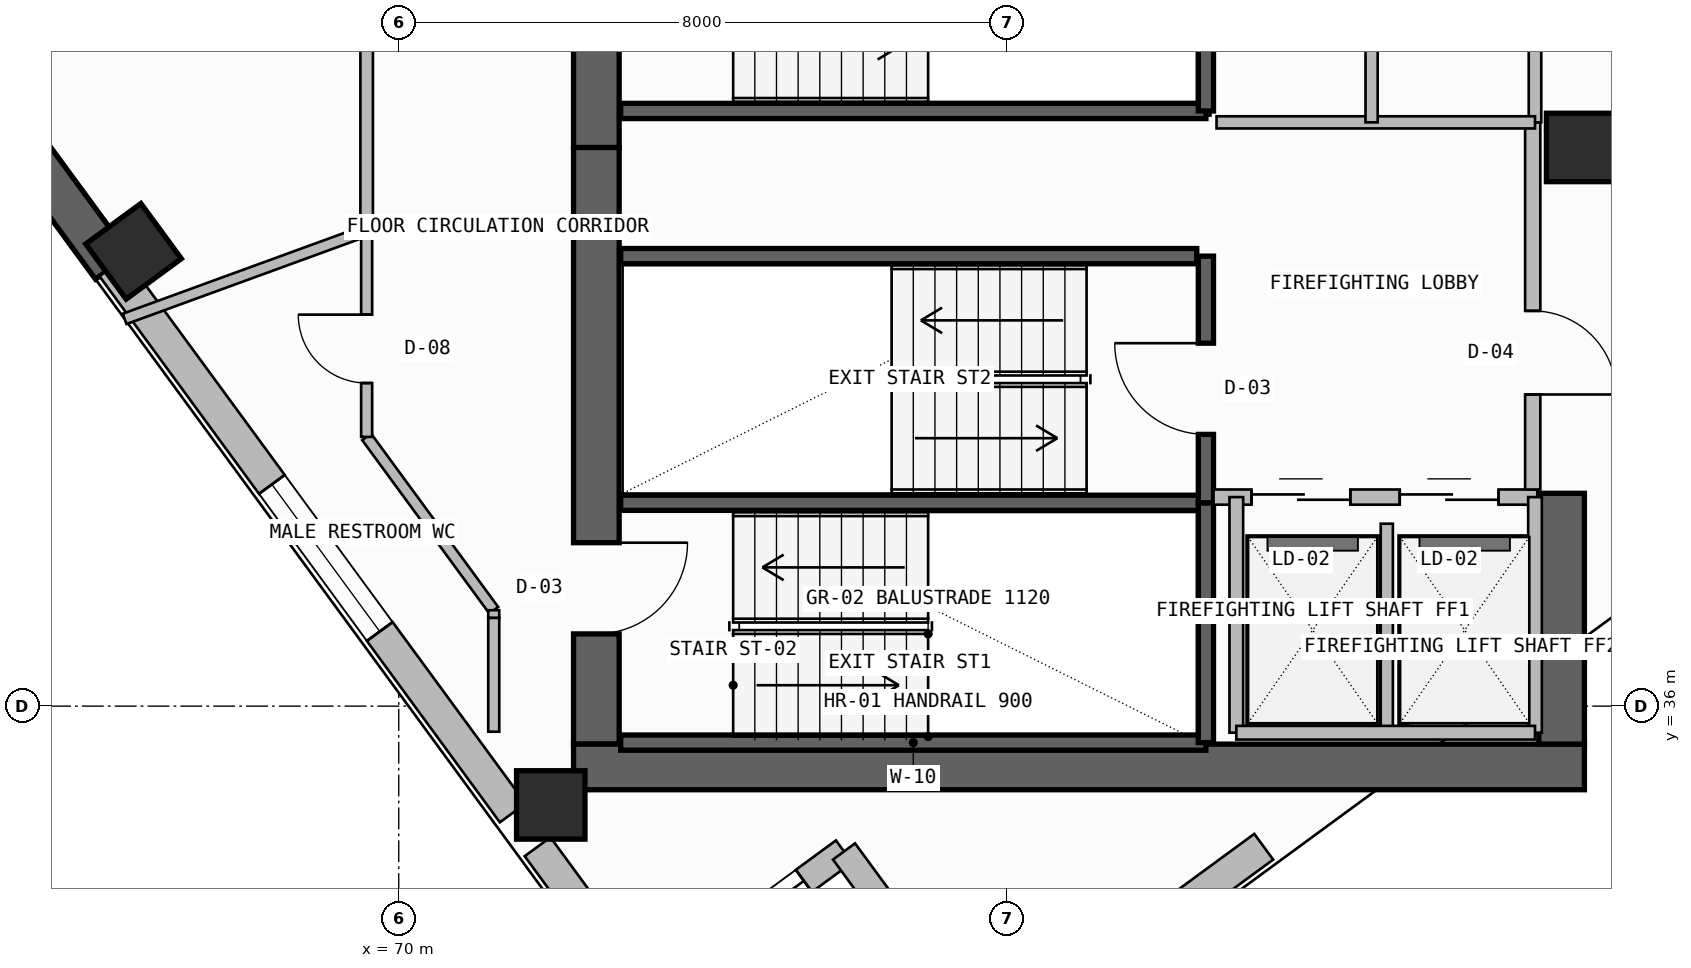
"""IFC4 building model, lengths in metres.
Left out: names, types, materials, properties, quantities, classifications, styles, units other than length and angle.
Written with IfcOpenShell. Run it as: python <this file> out.ifc"""

import sys

from ifc_helpers import new_model, si_unit, direction, frame, frame_2d, origin, origin_2d, place, context, subcontext, project, spatial, rectangle, extrude, element, fill, save


model = new_model("IFC4")
c1 = context("Model", 3, precision=1e-05, world=origin(), true_north=direction((0.0, 1.0)))
c2 = subcontext(c1, "Body", "Model", "MODEL_VIEW")
j1 = project(units=[si_unit("LENGTHUNIT", "METRE"), si_unit("PLANEANGLEUNIT", "RADIAN")], contexts=[c1])
p1 = place(None, origin())
s1 = spatial("IfcSite", under=j1, at=p1, CompositionType="ELEMENT")
p2 = place(p1, origin())
s2 = spatial("IfcBuilding", under=s1, at=p2, CompositionType="ELEMENT")
p3 = place(p2, frame((0.0, 0.0, 260.74)))
s3 = spatial("IfcBuildingStorey", under=s2, at=p3, CompositionType="ELEMENT", Elevation=260.74)
p4 = place(p3, frame((72.6, 35.5, -0.26), z_axis=(0.0, 0.0, 1.0), x_axis=(0.0, 1.0, 0.0)))
e1 = element("IfcWall", 1, at=p4, inside=s3, PredefinedType="SHEAR", context=c2, shape_type="SweptSolid", body=[
    extrude(rectangle(XDim=7.85, YDim=0.6, at=frame_2d((3.925, 0.0))), origin(), (0.0, 0.0, 1.0), 3.52),
])
p5 = place(p4, frame((1.45, 0.0, 0.26)))
e2 = element("IfcOpeningElement", 2, at=p5, cuts=e1, PredefinedType="OPENING", context=c2, shape_type="SweptSolid", body=[
    extrude(rectangle(XDim=1.2, YDim=2.2, at=frame_2d((0.6, 1.1))), frame((0.0, 0.31, 0.0), z_axis=(0.0, -1.0, 0.0), x_axis=(1.0, 0.0, 0.0)), (0.0, 0.0, 1.0), 0.62),
])
p6 = place(p3, frame((72.3, 35.2, -0.26), z_axis=(0.0, 0.0, 1.0), x_axis=(1.0, 0.0, 0.0)))
e3 = element("IfcWall", 3, at=p6, inside=s3, PredefinedType="SHEAR", context=c2, shape_type="SweptSolid", body=[
    extrude(rectangle(XDim=13.3, YDim=0.6, at=frame_2d((6.65, 0.0))), origin(), (0.0, 0.0, 1.0), 3.52),
])
p7 = place(p3, frame((85.3, 35.5, -0.26), z_axis=(0.0, 0.0, 1.0), x_axis=(0.0, 1.0, 0.0)))
e4 = element("IfcWall", 4, at=p7, inside=s3, PredefinedType="SHEAR", context=c2, shape_type="SweptSolid", body=[
    extrude(rectangle(XDim=3.3, YDim=0.6, at=frame_2d((1.65, 0.0))), origin(), (0.0, 0.0, 1.0), 3.52),
])
p8 = place(p3, frame((72.6, 43.35, -0.26), z_axis=(0.0, 0.0, 1.0), x_axis=(0.0, 1.0, 0.0)))
e5 = element("IfcWall", 5, at=p8, inside=s3, PredefinedType="SHEAR", context=c2, shape_type="SweptSolid", body=[
    extrude(rectangle(XDim=12.7, YDim=0.6, at=frame_2d((6.35, 0.0))), origin(), (0.0, 0.0, 1.0), 3.52),
])
p9 = place(p8, frame((1.35, 0.0, 0.26)))
e6 = element("IfcOpeningElement", 6, at=p9, cuts=e5, PredefinedType="OPENING", context=c2, shape_type="SweptSolid", body=[
    extrude(rectangle(XDim=1.2, YDim=2.2, at=frame_2d((0.6, 1.1))), frame((0.0, 0.31, 0.0), z_axis=(0.0, -1.0, 0.0), x_axis=(1.0, 0.0, 0.0)), (0.0, 0.0, 1.0), 0.62),
])
for number, where, z_axis, x_axis in (
    (7, (72.0, 34.7, 0.0), (0.0, 0.0, 1.0), (1.0, 0.0, 0.0)),
    (8, (85.55, 43.35, 0.0), (0.0, 0.0, 1.0), (1.0, 0.0, 0.0)),
    (9, (66.51, 41.983, 0.0), (0.0, 0.0, 1.0), (-0.591, 0.806, 0.0)),
):
    element("IfcColumn", number, at=place(p3, frame(where, z_axis=z_axis, x_axis=x_axis)), inside=s3, PredefinedType="COLUMN", context=c2, shape_type="SweptSolid", body=[
        extrude(rectangle(XDim=0.9, YDim=0.9, at=origin_2d()), origin(), (0.0, 0.0, 1.0), 3.52),
    ])
p10 = place(p3, frame((77.76, 31.495, 0.0), z_axis=(0.0, 0.0, 1.0), x_axis=(0.806458583304, 0.591290582891, 0.0)))
e10 = element("IfcWall", 10, at=p10, inside=s3, PredefinedType="SOLIDWALL", context=c2, shape_type="SweptSolid", body=[
    extrude(rectangle(XDim=4.49, YDim=0.42, at=frame_2d((2.245, 0.0))), origin(), (0.0, 0.0, 1.0), 3.26),
])
p11 = place(p3, frame((55.475, 56.45, -0.26), z_axis=(0.0, 0.0, 1.0), x_axis=(0.591309555876, -0.806444672082, 0.0)))
e11 = element("IfcWall", 11, at=p11, inside=s3, PredefinedType="SHEAR", context=c2, shape_type="SweptSolid", body=[
    extrude(rectangle(XDim=18.192, YDim=0.55, at=frame_2d((9.096, 0.0))), origin(), (0.0, 0.0, 1.0), 3.52),
])
p12 = place(p3, frame((66.232, 41.779, 0.0), z_axis=(0.0, 0.0, 1.0), x_axis=(0.591309008949, -0.806445073105, 0.0)))
e12 = element("IfcWall", 12, at=p12, inside=s3, PredefinedType="SOLIDWALL", context=c2, shape_type="SweptSolid", body=[
    extrude(rectangle(XDim=8.908, YDim=0.42, at=frame_2d((4.454, 0.0))), origin(), (0.0, 0.0, 1.0), 2.237),
])
p13 = place(p12, frame((3.549, 0.0, 0.957)))
e13 = element("IfcOpeningElement", 13, at=p13, cuts=e12, PredefinedType="OPENING", context=c2, shape_type="SweptSolid", body=[
    extrude(rectangle(XDim=2.4, YDim=1.2, at=frame_2d((1.2, 0.6))), frame((0.0, 0.22, 0.0), z_axis=(0.0, -1.0, 0.0), x_axis=(1.0, 0.0, 0.0)), (0.0, 0.0, 1.0), 0.44),
])
p14 = place(p3, frame((71.826, 34.15, 0.0), z_axis=(0.0, 0.0, 1.0), x_axis=(0.591315835946, -0.806440067308, 0.0)))
e14 = element("IfcWall", 14, at=p14, inside=s3, PredefinedType="SOLIDWALL", context=c2, shape_type="SweptSolid", body=[
    extrude(rectangle(XDim=2.434, YDim=0.42, at=frame_2d((1.217, 0.0))), origin(), (0.0, 0.0, 1.0), 3.26),
])
p15 = place(p3, frame((73.044, 32.024, 0.0), z_axis=(0.0, 0.0, 1.0), x_axis=(0.806433906667, 0.591324237774, 0.0)))
e15 = element("IfcWall", 15, at=p15, inside=s3, PredefinedType="SOLIDWALL", context=c2, shape_type="SweptSolid", body=[
    extrude(rectangle(XDim=3.49, YDim=0.36, at=frame_2d((1.745, 0.0))), origin(), (0.0, 0.0, 1.0), 3.26),
])
p16 = place(p15, frame((1.535, 0.0, 0.45)))
e16 = element("IfcOpeningElement", 16, at=p16, cuts=e15, PredefinedType="OPENING", context=c2, shape_type="SweptSolid", body=[
    extrude(rectangle(XDim=1.3, YDim=2.4, at=frame_2d((0.65, 1.2))), frame((0.0, 0.19, 0.0), z_axis=(0.0, -1.0, 0.0), x_axis=(1.0, 0.0, 0.0)), (0.0, 0.0, 1.0), 0.38),
])
p17 = place(p3, frame((75.859, 34.088, 0.0), z_axis=(0.0, 0.0, 1.0), x_axis=(0.591336371625, -0.806425009281, 0.0)))
e17 = element("IfcWall", 17, at=p17, inside=s3, PredefinedType="SOLIDWALL", context=c2, shape_type="SweptSolid", body=[
    extrude(rectangle(XDim=3.49, YDim=0.36, at=frame_2d((1.745, 0.0))), origin(), (0.0, 0.0, 1.0), 3.26),
])
for number, where, z_axis, x_axis in (
    (18, (72.92, 35.52, -0.26), (0.0, 0.0, 1.0), (1.0, 0.0, 0.0)),
    (19, (72.92, 38.675, -0.26), (0.0, 0.0, 1.0), (1.0, 0.0, 0.0)),
):
    element("IfcWall", number, at=place(p3, frame(where, z_axis=z_axis, x_axis=x_axis)), inside=s3, PredefinedType="SOLIDWALL", context=c2, shape_type="SweptSolid", body=[
        extrude(rectangle(XDim=7.7, YDim=0.2, at=frame_2d((3.85, 0.0))), origin(), (0.0, 0.0, 1.0), 3.52),
    ])
p18 = place(p3, frame((80.62, 35.52, -0.26), z_axis=(0.0, 0.0, 1.0), x_axis=(0.0, 1.0, 0.0)))
e20 = element("IfcWall", 20, at=p18, inside=s3, PredefinedType="SOLIDWALL", context=c2, shape_type="SweptSolid", body=[
    extrude(rectangle(XDim=3.155, YDim=0.2, at=frame_2d((1.578, 0.0))), origin(), (0.0, 0.0, 1.0), 3.52),
])
p19 = place(p3, frame((80.62, 38.675, -0.26), z_axis=(0.0, 0.0, 1.0), x_axis=(0.0, 1.0, 0.0)))
e21 = element("IfcWall", 21, at=p19, inside=s3, PredefinedType="SOLIDWALL", context=c2, shape_type="SweptSolid", body=[
    extrude(rectangle(XDim=3.245, YDim=0.2, at=frame_2d((1.623, 0.0))), origin(), (0.0, 0.0, 1.0), 3.52),
])
p20 = place(p19, frame((0.9, 0.0, 0.26)))
e22 = element("IfcOpeningElement", 22, at=p20, cuts=e21, PredefinedType="OPENING", context=c2, shape_type="SweptSolid", body=[
    extrude(rectangle(XDim=1.2, YDim=2.2, at=frame_2d((0.6, 1.1))), frame((0.0, 0.11, 0.0), z_axis=(0.0, -1.0, 0.0), x_axis=(1.0, 0.0, 0.0)), (0.0, 0.0, 1.0), 0.22),
])
p21 = place(p3, frame((80.72, 38.75, 0.0), z_axis=(0.0, 0.0, 1.0), x_axis=(1.0, 0.0, 0.0)))
e23 = element("IfcWall", 23, at=p21, inside=s3, PredefinedType="SOLIDWALL", context=c2, shape_type="SweptSolid", body=[
    extrude(rectangle(XDim=4.26, YDim=0.2, at=frame_2d((2.13, 0.0))), origin(), (0.0, 0.0, 1.0), 3.26),
])
p22 = place(p21, frame((0.5, 0.0, 0.0)))
e24 = element("IfcOpeningElement", 24, at=p22, cuts=e23, PredefinedType="OPENING", context=c2, shape_type="SweptSolid", body=[
    extrude(rectangle(XDim=1.3, YDim=2.3, at=frame_2d((0.65, 1.15))), frame((0.0, 0.11, 0.0), z_axis=(0.0, -1.0, 0.0), x_axis=(1.0, 0.0, 0.0)), (0.0, 0.0, 1.0), 0.22),
])
p23 = place(p21, frame((2.45, 0.0, 0.0)))
e25 = element("IfcOpeningElement", 25, at=p23, cuts=e23, PredefinedType="OPENING", context=c2, shape_type="SweptSolid", body=[
    extrude(rectangle(XDim=1.3, YDim=2.3, at=frame_2d((0.65, 1.15))), frame((0.0, 0.11, 0.0), z_axis=(0.0, -1.0, 0.0), x_axis=(1.0, 0.0, 0.0)), (0.0, 0.0, 1.0), 0.22),
])
p24 = place(p3, frame((83.0, 35.65, 0.0), z_axis=(0.0, 0.0, 1.0), x_axis=(0.0, 1.0, 0.0)))
e26 = element("IfcWall", 26, at=p24, inside=s3, PredefinedType="PLUMBINGWALL", context=c2, shape_type="SweptSolid", body=[
    extrude(rectangle(XDim=2.75, YDim=0.16, at=frame_2d((1.375, 0.0))), origin(), (0.0, 0.0, 1.0), 3.26),
])
for number, where, z_axis, x_axis in (
    (27, (84.95, 35.65, 0.0), (0.0, 0.0, 1.0), (0.0, 1.0, 0.0)),
    (28, (81.02, 35.65, 0.0), (0.0, 0.0, 1.0), (0.0, 1.0, 0.0)),
):
    element("IfcWall", number, at=place(p3, frame(where, z_axis=z_axis, x_axis=x_axis)), inside=s3, PredefinedType="SOLIDWALL", context=c2, shape_type="SweptSolid", body=[
        extrude(rectangle(XDim=3.1, YDim=0.18, at=frame_2d((1.55, 0.0))), origin(), (0.0, 0.0, 1.0), 3.26),
    ])
p25 = place(p3, frame((81.02, 35.65, 0.0), z_axis=(0.0, 0.0, 1.0), x_axis=(1.0, 0.0, 0.0)))
e29 = element("IfcWall", 29, at=p25, inside=s3, PredefinedType="SOLIDWALL", context=c2, shape_type="SweptSolid", body=[
    extrude(rectangle(XDim=3.93, YDim=0.18, at=frame_2d((1.965, 0.0))), origin(), (0.0, 0.0, 1.0), 3.26),
])
p26 = place(p3, frame((84.92, 38.85, 0.0), z_axis=(0.0, 0.0, 1.0), x_axis=(0.0, 1.0, 0.0)))
e30 = element("IfcWall", 30, at=p26, inside=s3, PredefinedType="SOLIDWALL", context=c2, shape_type="SweptSolid", body=[
    extrude(rectangle(XDim=4.83, YDim=0.2, at=frame_2d((2.415, 0.0))), origin(), (0.0, 0.0, 1.0), 3.26),
])
p27 = place(p26, frame((1.25, 0.0, 0.0)))
e31 = element("IfcOpeningElement", 31, at=p27, cuts=e30, PredefinedType="OPENING", context=c2, shape_type="SweptSolid", body=[
    extrude(rectangle(XDim=1.1, YDim=2.2, at=frame_2d((0.55, 1.1))), frame((0.0, 0.11, 0.0), z_axis=(0.0, -1.0, 0.0), x_axis=(1.0, 0.0, 0.0)), (0.0, 0.0, 1.0), 0.22),
])
p28 = place(p3, frame((72.92, 41.92, -0.26), z_axis=(0.0, 0.0, 1.0), x_axis=(1.0, 0.0, 0.0)))
e32 = element("IfcWall", 32, at=p28, inside=s3, PredefinedType="SOLIDWALL", context=c2, shape_type="SweptSolid", body=[
    extrude(rectangle(XDim=7.58, YDim=0.2, at=frame_2d((3.79, 0.0))), origin(), (0.0, 0.0, 1.0), 3.52),
])
p29 = place(p3, frame((72.92, 43.83, -0.26), z_axis=(0.0, 0.0, 1.0), x_axis=(1.0, 0.0, 0.0)))
e33 = element("IfcWall", 33, at=p29, inside=s3, PredefinedType="SOLIDWALL", context=c2, shape_type="SweptSolid", body=[
    extrude(rectangle(XDim=7.7, YDim=0.2, at=frame_2d((3.85, 0.0))), origin(), (0.0, 0.0, 1.0), 3.52),
])
p30 = place(p3, frame((80.62, 43.83, -0.26), z_axis=(0.0, 0.0, 1.0), x_axis=(0.0, 1.0, 0.0)))
e34 = element("IfcWall", 34, at=p30, inside=s3, PredefinedType="SOLIDWALL", context=c2, shape_type="SweptSolid", body=[
    extrude(rectangle(XDim=3.24, YDim=0.2, at=frame_2d((1.62, 0.0))), origin(), (0.0, 0.0, 1.0), 3.52),
])
p31 = place(p3, frame((84.95, 43.68, 0.0), z_axis=(0.0, 0.0, 1.0), x_axis=(0.0, 1.0, 0.0)))
e35 = element("IfcWall", 35, at=p31, inside=s3, PredefinedType="PLUMBINGWALL", context=c2, shape_type="SweptSolid", body=[
    extrude(rectangle(XDim=1.9, YDim=0.165, at=frame_2d((0.95, 0.0))), origin(), (0.0, 0.0, 1.0), 3.26),
])
p32 = place(p3, frame((80.76, 43.68, 0.0), z_axis=(0.0, 0.0, 1.0), x_axis=(1.0, 0.0, 0.0)))
e36 = element("IfcWall", 36, at=p32, inside=s3, PredefinedType="PLUMBINGWALL", context=c2, shape_type="SweptSolid", body=[
    extrude(rectangle(XDim=4.19, YDim=0.16, at=frame_2d((2.095, 0.0))), origin(), (0.0, 0.0, 1.0), 3.26),
])
p33 = place(p3, frame((82.8, 43.68, 0.0), z_axis=(0.0, 0.0, 1.0), x_axis=(0.0, 1.0, 0.0)))
e37 = element("IfcWall", 37, at=p33, inside=s3, PredefinedType="PLUMBINGWALL", context=c2, shape_type="SweptSolid", body=[
    extrude(rectangle(XDim=1.9, YDim=0.16, at=frame_2d((0.95, 0.0))), origin(), (0.0, 0.0, 1.0), 3.26),
])
p34 = place(p3, frame((69.578, 39.542, 0.0), z_axis=(0.0, 0.0, 1.0), x_axis=(0.591303776917, -0.806448909357, 0.0)))
e38 = element("IfcWall", 38, at=p34, inside=s3, PredefinedType="PARTITIONING", context=c2, shape_type="SweptSolid", body=[
    extrude(rectangle(XDim=2.828, YDim=0.145, at=frame_2d((1.414, 0.0))), origin(), (0.0, 0.0, 1.0), 3.26),
])
p35 = place(p3, frame((69.578, 42.294, 0.0), z_axis=(0.0, 0.0, 1.0), x_axis=(0.0, -1.0, 0.0)))
e39 = element("IfcWall", 39, at=p35, inside=s3, PredefinedType="PARTITIONING", context=c2, shape_type="SweptSolid", body=[
    extrude(rectangle(XDim=2.752, YDim=0.145, at=frame_2d((1.376, 0.0))), origin(), (0.0, 0.0, 1.0), 3.26),
])
p36 = place(p35, frame((1.144, 0.0, 0.0)))
e40 = element("IfcOpeningElement", 40, at=p36, cuts=e39, PredefinedType="OPENING", context=c2, shape_type="SweptSolid", body=[
    extrude(rectangle(XDim=0.9, YDim=2.1, at=frame_2d((0.45, 1.05))), frame((0.0, 0.083, 0.0), z_axis=(0.0, -1.0, 0.0), x_axis=(1.0, 0.0, 0.0)), (0.0, 0.0, 1.0), 0.165),
])
p37 = place(p3, frame((71.25, 37.261, 0.0), z_axis=(0.0, 0.0, 1.0), x_axis=(0.0, -1.0, 0.0)))
e41 = element("IfcWall", 41, at=p37, inside=s3, PredefinedType="PARTITIONING", context=c2, shape_type="SweptSolid", body=[
    extrude(rectangle(XDim=0.102, YDim=0.145, at=frame_2d((0.051, 0.0))), origin(), (0.0, 0.0, 1.0), 3.26),
])
p38 = place(p3, frame((66.393, 41.095, 0.0), z_axis=(0.0, 0.0, 1.0), x_axis=(0.939471141622, 0.342628040388, 0.0)))
e42 = element("IfcWall", 42, at=p38, inside=s3, PredefinedType="PARTITIONING", context=c2, shape_type="SweptSolid", body=[
    extrude(rectangle(XDim=3.3, YDim=0.145, at=frame_2d((1.65, 0.0))), origin(), (0.0, 0.0, 1.0), 2.237),
])
p39 = place(p3, frame((69.578, 49.956, 0.0), z_axis=(0.0, 0.0, 1.0), x_axis=(0.0, -1.0, 0.0)))
e43 = element("IfcWall", 43, at=p39, inside=s3, PredefinedType="PARTITIONING", context=c2, shape_type="SweptSolid", body=[
    extrude(rectangle(XDim=7.636, YDim=0.165, at=frame_2d((3.818, 0.0))), origin(), (0.0, 0.0, 1.0), 3.26),
])
p40 = place(p39, frame((3.318, 0.0, 0.0)))
e44 = element("IfcOpeningElement", 44, at=p40, cuts=e43, PredefinedType="OPENING", context=c2, shape_type="SweptSolid", body=[
    extrude(rectangle(XDim=1.0, YDim=2.2, at=frame_2d((0.5, 1.1))), frame((0.0, 0.093, 0.0), z_axis=(0.0, -1.0, 0.0), x_axis=(1.0, 0.0, 0.0)), (0.0, 0.0, 1.0), 0.185),
])
p41 = place(p3, frame((71.25, 37.16, 0.0), z_axis=(0.0, 0.0, 1.0), x_axis=(0.0, -1.0, 0.0)))
e45 = element("IfcWall", 45, at=p41, inside=s3, PredefinedType="PARTITIONING", context=c2, shape_type="SweptSolid", body=[
    extrude(rectangle(XDim=1.497, YDim=0.145, at=frame_2d((0.748, 0.0))), origin(), (0.0, 0.0, 1.0), 3.26),
])
p42 = place(p13, origin())
e46 = element("IfcWindow", 46, at=p42, inside=s3, PartitioningType="SINGLE_PANEL", PredefinedType="WINDOW", context=c2, shape_type="SweptSolid", body=[
    extrude(rectangle(XDim=2.4, YDim=1.2, at=frame_2d((1.2, 0.6))), frame((0.0, 0.03, 0.0), z_axis=(0.0, -1.0, 0.0), x_axis=(1.0, 0.0, 0.0)), (0.0, 0.0, 1.0), 0.06),
])
fill(e13, e46)
p43 = place(p16, origin())
e47 = element("IfcWindow", 47, at=p43, inside=s3, PartitioningType="SINGLE_PANEL", PredefinedType="WINDOW", context=c2, shape_type="SweptSolid", body=[
    extrude(rectangle(XDim=1.3, YDim=2.4, at=frame_2d((0.65, 1.2))), frame((0.0, 0.03, 0.0), z_axis=(0.0, -1.0, 0.0), x_axis=(1.0, 0.0, 0.0)), (0.0, 0.0, 1.0), 0.06),
])
fill(e16, e47)
p44 = place(p5, frame((1.2, 0.0, 0.0), z_axis=(0.0, 0.0, 1.0), x_axis=(-1.0, 0.0, 0.0)))
e48 = element("IfcDoor", 48, at=p44, inside=s3, OperationType="SINGLE_SWING_LEFT", PredefinedType="USERDEFINED", context=c2, shape_type="SweptSolid", body=[
    extrude(rectangle(XDim=1.2, YDim=2.2, at=frame_2d((0.6, 1.1))), frame((0.0, 0.025, 0.0), z_axis=(0.0, -1.0, 0.0), x_axis=(1.0, 0.0, 0.0)), (0.0, 0.0, 1.0), 0.05),
])
fill(e2, e48)
p45 = place(p20, origin())
e49 = element("IfcDoor", 49, at=p45, inside=s3, OperationType="SINGLE_SWING_RIGHT", PredefinedType="USERDEFINED", context=c2, shape_type="SweptSolid", body=[
    extrude(rectangle(XDim=1.2, YDim=2.2, at=frame_2d((0.6, 1.1))), frame((0.0, 0.025, 0.0), z_axis=(0.0, -1.0, 0.0), x_axis=(1.0, 0.0, 0.0)), (0.0, 0.0, 1.0), 0.05),
])
fill(e22, e49)
p46 = place(p22, origin())
e50 = element("IfcDoor", 50, at=p46, inside=s3, OperationType="DOUBLE_DOOR_SLIDING", PredefinedType="DOOR", context=c2, shape_type="SweptSolid", body=[
    extrude(rectangle(XDim=1.3, YDim=2.3, at=frame_2d((0.65, 1.15))), frame((0.0, 0.025, 0.0), z_axis=(0.0, -1.0, 0.0), x_axis=(1.0, 0.0, 0.0)), (0.0, 0.0, 1.0), 0.05),
])
fill(e24, e50)
p47 = place(p23, origin())
e51 = element("IfcDoor", 51, at=p47, inside=s3, OperationType="DOUBLE_DOOR_SLIDING", PredefinedType="DOOR", context=c2, shape_type="SweptSolid", body=[
    extrude(rectangle(XDim=1.3, YDim=2.3, at=frame_2d((0.65, 1.15))), frame((0.0, 0.025, 0.0), z_axis=(0.0, -1.0, 0.0), x_axis=(1.0, 0.0, 0.0)), (0.0, 0.0, 1.0), 0.05),
])
fill(e25, e51)
p48 = place(p27, frame((1.1, 0.0, 0.0), z_axis=(0.0, 0.0, 1.0), x_axis=(-1.0, 0.0, 0.0)))
e52 = element("IfcDoor", 52, at=p48, inside=s3, OperationType="SINGLE_SWING_RIGHT", PredefinedType="DOOR", context=c2, shape_type="SweptSolid", body=[
    extrude(rectangle(XDim=1.1, YDim=2.2, at=frame_2d((0.55, 1.1))), frame((0.0, 0.025, 0.0), z_axis=(0.0, -1.0, 0.0), x_axis=(1.0, 0.0, 0.0)), (0.0, 0.0, 1.0), 0.05),
])
fill(e31, e52)
p49 = place(p36, frame((0.9, 0.0, 0.0), z_axis=(0.0, 0.0, 1.0), x_axis=(-1.0, 0.0, 0.0)))
e53 = element("IfcDoor", 53, at=p49, inside=s3, OperationType="SINGLE_SWING_RIGHT", PredefinedType="DOOR", context=c2, shape_type="SweptSolid", body=[
    extrude(rectangle(XDim=0.9, YDim=2.1, at=frame_2d((0.45, 1.05))), frame((0.0, 0.025, 0.0), z_axis=(0.0, -1.0, 0.0), x_axis=(1.0, 0.0, 0.0)), (0.0, 0.0, 1.0), 0.05),
])
fill(e40, e53)
save(model, sys.argv[1])
